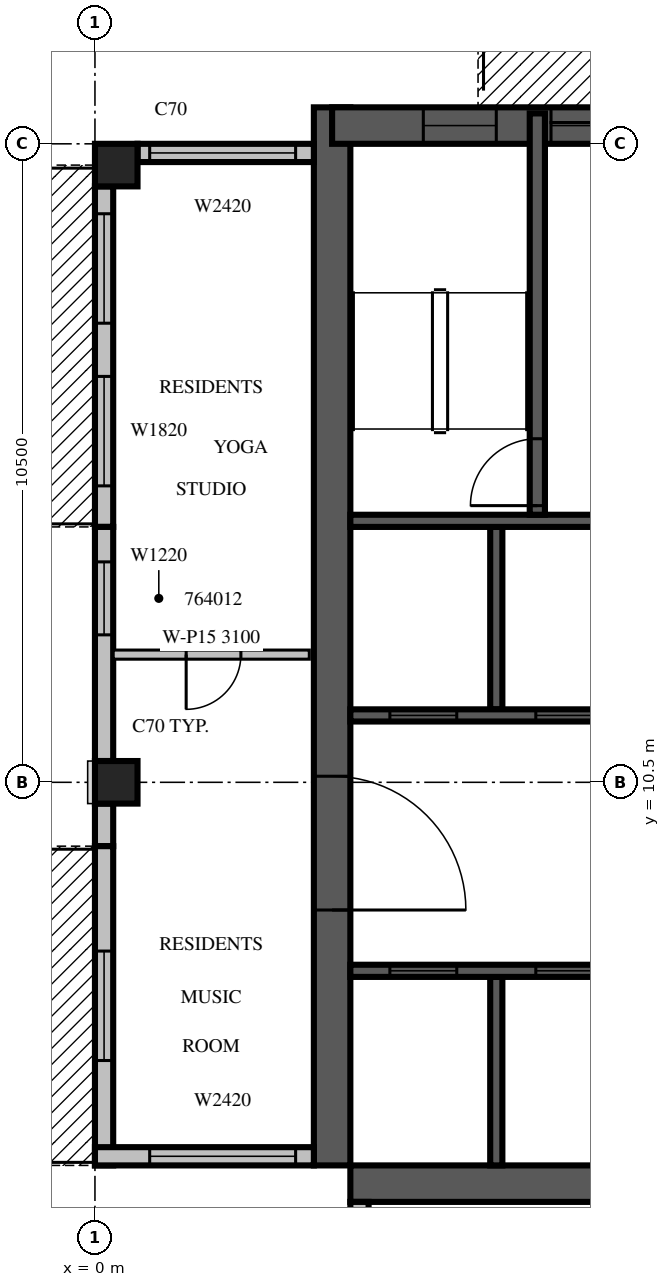
"""IFC4 building model, lengths in metres.
Left out: names, types, materials, properties, quantities, classifications, styles, units other than length and angle.
Written with IfcOpenShell. Run it as: python <this file> out.ifc"""

import sys

from ifc_helpers import new_model, si_unit, direction, frame, frame_2d, origin, origin_2d, place, context, subcontext, project, spatial, rectangle, extrude, source, transform, mapped, element, fill, save


model = new_model("IFC4")
c1 = context("Model", 3, precision=1e-05, world=origin(), true_north=direction((0.0, 1.0)))
c2 = subcontext(c1, "Body", "Model", "MODEL_VIEW")
j1 = project(units=[si_unit("LENGTHUNIT", "METRE"), si_unit("PLANEANGLEUNIT", "RADIAN")], contexts=[c1])
p1 = place(None, origin())
s1 = spatial("IfcSite", under=j1, at=p1, CompositionType="ELEMENT")
p2 = place(p1, origin())
s2 = spatial("IfcBuilding", under=s1, at=p2, CompositionType="ELEMENT")
p3 = place(p2, frame((0.0, 0.0, 284.5)))
s3 = spatial("IfcBuildingStorey", under=s2, at=p3, CompositionType="ELEMENT", Elevation=284.5)
m1 = source(origin(), c2, "Body", "SweptSolid", [
    extrude(rectangle(XDim=0.7, YDim=0.7, at=origin_2d()), origin(), (0.0, 0.0, 1.0), 3.5),
])
for number, where, z_axis, x_axis in (
    (1, (0.35, 10.5, 0.0), (0.0, 0.0, 1.0), (1.0, 0.0, 0.0)),
    (2, (0.35, 20.65, 0.0), (0.0, 0.0, 1.0), (1.0, 0.0, 0.0)),
):
    element("IfcColumn", number, at=place(p3, frame(where, z_axis=z_axis, x_axis=x_axis)), inside=s3, PredefinedType="COLUMN", context=c2, shape_type="MappedRepresentation", body=[
        mapped(m1, transform((0.0, 0.0, 0.0), scale=1.0)),
    ])
p4 = place(p3, frame((3.9, 4.2, 0.0), z_axis=(0.0, 0.0, 1.0), x_axis=(0.0, 1.0, 0.0)))
e3 = element("IfcWall", 3, at=p4, inside=s3, PredefinedType="SHEAR", context=c2, shape_type="SweptSolid", body=[
    extrude(rectangle(XDim=17.4, YDim=0.6, at=frame_2d((8.7, 0.0))), origin(), (0.0, 0.0, 1.0), 3.5),
])
m2 = source(origin(), c2, "Body", "SweptSolid", [
    extrude(rectangle(XDim=2.2, YDim=2.1, at=frame_2d((1.1, 1.05))), frame((0.0, 0.31, 0.0), z_axis=(0.0, -1.0, 0.0), x_axis=(1.0, 0.0, 0.0)), (0.0, 0.0, 1.0), 0.62),
])
p5 = place(p4, frame((4.2, 0.0, 0.0)))
e4 = element("IfcOpeningElement", 4, at=p5, cuts=e3, PredefinedType="OPENING", context=c2, shape_type="MappedRepresentation", body=[
    mapped(m2, transform((0.0, 0.0, 0.0), scale=1.0)),
])
m3 = source(origin(), c2, "Body", "SweptSolid", [
    extrude(rectangle(XDim=17.4, YDim=0.6, at=frame_2d((8.7, 0.0))), origin(), (0.0, 0.0, 1.0), 3.5),
])
p6 = place(p3, frame((4.2, 3.9, 0.0), z_axis=(0.0, 0.0, 1.0), x_axis=(1.0, 0.0, 0.0)))
e5 = element("IfcWall", 5, at=p6, inside=s3, PredefinedType="SHEAR", context=c2, shape_type="MappedRepresentation", body=[
    mapped(m3, transform((0.0, 0.0, 0.0), scale=1.0)),
])
p7 = place(p6, frame((11.55, 0.0, 0.0)))
e6 = element("IfcOpeningElement", 6, at=p7, cuts=e5, PredefinedType="OPENING", context=c2, shape_type="SweptSolid", body=[
    extrude(rectangle(XDim=0.9, YDim=2.1, at=frame_2d((0.45, 1.05))), frame((0.0, 0.31, 0.0), z_axis=(0.0, -1.0, 0.0), x_axis=(1.0, 0.0, 0.0)), (0.0, 0.0, 1.0), 0.62),
])
p8 = place(p3, frame((3.9, 21.3, 0.0), z_axis=(0.0, 0.0, 1.0), x_axis=(1.0, 0.0, 0.0)))
e7 = element("IfcWall", 7, at=p8, inside=s3, PredefinedType="SHEAR", context=c2, shape_type="SweptSolid", body=[
    extrude(rectangle(XDim=6.6, YDim=0.6, at=frame_2d((3.3, 0.0))), origin(), (0.0, 0.0, 1.0), 3.5),
])
m4 = source(origin(), c2, "Body", "SweptSolid", [
    extrude(rectangle(XDim=1.2, YDim=2.4, at=frame_2d((0.6, 1.2))), frame((0.0, 0.31, 0.0), z_axis=(0.0, -1.0, 0.0), x_axis=(1.0, 0.0, 0.0)), (0.0, 0.0, 1.0), 0.62),
])
p9 = place(p8, frame((1.5, 0.0, 0.6)))
e8 = element("IfcOpeningElement", 8, at=p9, cuts=e7, PredefinedType="OPENING", context=c2, shape_type="MappedRepresentation", body=[
    mapped(m4, transform((0.0, 0.0, 0.0), scale=1.0)),
])
p10 = place(p8, frame((3.6, 0.0, 0.6)))
e9 = element("IfcOpeningElement", 9, at=p10, cuts=e7, PredefinedType="OPENING", context=c2, shape_type="MappedRepresentation", body=[
    mapped(m4, transform((0.0, 0.0, 0.0), scale=1.0)),
])
p11 = place(p3, frame((3.6, 20.85, 0.0), z_axis=(0.0, 0.0, 1.0), x_axis=(-1.0, 0.0, 0.0)))
e10 = element("IfcWall", 10, at=p11, inside=s3, PredefinedType="STANDARD", context=c2, shape_type="SweptSolid", body=[
    extrude(rectangle(XDim=2.9, YDim=0.3, at=frame_2d((1.45, 0.0))), origin(), (0.0, 0.0, 1.0), 3.1),
])
m5 = source(origin(), c2, "Body", "SweptSolid", [
    extrude(rectangle(XDim=2.4, YDim=2.0, at=frame_2d((1.2, 1.0))), frame((0.0, 0.16, 0.0), z_axis=(0.0, -1.0, 0.0), x_axis=(1.0, 0.0, 0.0)), (0.0, 0.0, 1.0), 0.32),
])
p12 = place(p11, frame((0.3, 0.0, 0.6)))
e11 = element("IfcOpeningElement", 11, at=p12, cuts=e10, PredefinedType="OPENING", context=c2, shape_type="MappedRepresentation", body=[
    mapped(m5, transform((0.0, 0.0, 0.0), scale=1.0)),
])
p13 = place(p3, frame((0.15, 20.3, 0.0), z_axis=(0.0, 0.0, 1.0), x_axis=(0.0, -1.0, 0.0)))
e12 = element("IfcWall", 12, at=p13, inside=s3, PredefinedType="STANDARD", context=c2, shape_type="SweptSolid", body=[
    extrude(rectangle(XDim=5.6, YDim=0.3, at=frame_2d((2.8, 0.0))), origin(), (0.0, 0.0, 1.0), 3.1),
])
m6 = source(origin(), c2, "Body", "SweptSolid", [
    extrude(rectangle(XDim=1.8, YDim=2.4, at=frame_2d((0.9, 1.2))), frame((0.0, 0.16, 0.0), z_axis=(0.0, -1.0, 0.0), x_axis=(1.0, 0.0, 0.0)), (0.0, 0.0, 1.0), 0.32),
])
p14 = place(p13, frame((0.45, 0.0, 0.0)))
e13 = element("IfcOpeningElement", 13, at=p14, cuts=e12, PredefinedType="OPENING", context=c2, shape_type="MappedRepresentation", body=[
    mapped(m6, transform((0.0, 0.0, 0.0), scale=1.0)),
])
m7 = source(origin(), c2, "Body", "SweptSolid", [
    extrude(rectangle(XDim=1.8, YDim=2.0, at=frame_2d((0.9, 1.0))), frame((0.0, 0.16, 0.0), z_axis=(0.0, -1.0, 0.0), x_axis=(1.0, 0.0, 0.0)), (0.0, 0.0, 1.0), 0.32),
])
p15 = place(p13, frame((3.125, 0.0, 0.6)))
e14 = element("IfcOpeningElement", 14, at=p15, cuts=e12, PredefinedType="OPENING", context=c2, shape_type="MappedRepresentation", body=[
    mapped(m7, transform((0.0, 0.0, 0.0), scale=1.0)),
])
p16 = place(p3, frame((0.15, 14.7, 0.0), z_axis=(0.0, 0.0, 1.0), x_axis=(0.0, -1.0, 0.0)))
e15 = element("IfcWall", 15, at=p16, inside=s3, PredefinedType="STANDARD", context=c2, shape_type="SweptSolid", body=[
    extrude(rectangle(XDim=3.85, YDim=0.3, at=frame_2d((1.925, 0.0))), origin(), (0.0, 0.0, 1.0), 3.1),
])
m8 = source(origin(), c2, "Body", "SweptSolid", [
    extrude(rectangle(XDim=1.2, YDim=2.0, at=frame_2d((0.6, 1.0))), frame((0.0, 0.16, 0.0), z_axis=(0.0, -1.0, 0.0), x_axis=(1.0, 0.0, 0.0)), (0.0, 0.0, 1.0), 0.32),
])
p17 = place(p16, frame((0.575, 0.0, 0.6)))
e16 = element("IfcOpeningElement", 16, at=p17, cuts=e15, PredefinedType="OPENING", context=c2, shape_type="MappedRepresentation", body=[
    mapped(m8, transform((0.0, 0.0, 0.0), scale=1.0)),
])
p18 = place(p3, frame((0.15, 10.15, 0.0), z_axis=(0.0, 0.0, 1.0), x_axis=(0.0, -1.0, 0.0)))
e17 = element("IfcWall", 17, at=p18, inside=s3, PredefinedType="STANDARD", context=c2, shape_type="SweptSolid", body=[
    extrude(rectangle(XDim=0.7, YDim=0.3, at=frame_2d((0.35, 0.0))), origin(), (0.0, 0.0, 1.0), 3.1),
])
p19 = place(p3, frame((0.15, 9.45, 0.0), z_axis=(0.0, 0.0, 1.0), x_axis=(0.0, -1.0, 0.0)))
e18 = element("IfcWall", 18, at=p19, inside=s3, PredefinedType="STANDARD", context=c2, shape_type="SweptSolid", body=[
    extrude(rectangle(XDim=5.25, YDim=0.3, at=frame_2d((2.625, 0.0))), origin(), (0.0, 0.0, 1.0), 3.1),
])
p20 = place(p19, frame((1.725, 0.0, 0.0)))
e19 = element("IfcOpeningElement", 19, at=p20, cuts=e18, PredefinedType="OPENING", context=c2, shape_type="MappedRepresentation", body=[
    mapped(m6, transform((0.0, 0.0, 0.0), scale=1.0)),
])
p21 = place(p3, frame((0.0, 4.35, 0.0), z_axis=(0.0, 0.0, 1.0), x_axis=(1.0, 0.0, 0.0)))
e20 = element("IfcWall", 20, at=p21, inside=s3, PredefinedType="STANDARD", context=c2, shape_type="SweptSolid", body=[
    extrude(rectangle(XDim=3.6, YDim=0.3, at=frame_2d((1.8, 0.0))), origin(), (0.0, 0.0, 1.0), 3.1),
])
p22 = place(p21, frame((0.9, 0.0, 0.6)))
e21 = element("IfcOpeningElement", 21, at=p22, cuts=e20, PredefinedType="OPENING", context=c2, shape_type="MappedRepresentation", body=[
    mapped(m5, transform((0.0, 0.0, 0.0), scale=1.0)),
])
m9 = source(origin(), c2, "Body", "SweptSolid", [
    extrude(rectangle(XDim=3.6, YDim=0.3, at=frame_2d((1.8, 0.0))), origin(), (0.0, 0.0, 1.0), 3.1),
])
p23 = place(p3, frame((4.35, 3.6, 0.0), z_axis=(0.0, 0.0, 1.0), x_axis=(0.0, -1.0, 0.0)))
e22 = element("IfcWall", 22, at=p23, inside=s3, PredefinedType="STANDARD", context=c2, shape_type="MappedRepresentation", body=[
    mapped(m9, transform((0.0, 0.0, 0.0), scale=1.0)),
])
p24 = place(p23, frame((0.3, 0.0, 0.6)))
e23 = element("IfcOpeningElement", 23, at=p24, cuts=e22, PredefinedType="OPENING", context=c2, shape_type="MappedRepresentation", body=[
    mapped(m5, transform((0.0, 0.0, 0.0), scale=1.0)),
])
p25 = place(p3, frame((6.6, 4.2, 0.0), z_axis=(0.0, 0.0, 1.0), x_axis=(0.0, 1.0, 0.0)))
e24 = element("IfcWall", 24, at=p25, inside=s3, PredefinedType="SOLIDWALL", context=c2, shape_type="SweptSolid", body=[
    extrude(rectangle(XDim=3.1, YDim=0.2, at=frame_2d((1.55, 0.0))), origin(), (0.0, 0.0, 1.0), 3.5),
])
p26 = place(p3, frame((6.6, 11.7, 0.0), z_axis=(0.0, 0.0, 1.0), x_axis=(0.0, 1.0, 0.0)))
e25 = element("IfcWall", 25, at=p26, inside=s3, PredefinedType="SOLIDWALL", context=c2, shape_type="SweptSolid", body=[
    extrude(rectangle(XDim=3.0, YDim=0.2, at=frame_2d((1.5, 0.0))), origin(), (0.0, 0.0, 1.0), 3.5),
])
p27 = place(p3, frame((4.2, 7.4, 0.0), z_axis=(0.0, 0.0, 1.0), x_axis=(1.0, 0.0, 0.0)))
e26 = element("IfcWall", 26, at=p27, inside=s3, PredefinedType="SOLIDWALL", context=c2, shape_type="SweptSolid", body=[
    extrude(rectangle(XDim=9.6, YDim=0.2, at=frame_2d((4.8, 0.0))), origin(), (0.0, 0.0, 1.0), 3.5),
])
m10 = source(origin(), c2, "Body", "SweptSolid", [
    extrude(rectangle(XDim=1.1, YDim=2.1, at=frame_2d((0.55, 1.05))), frame((0.0, 0.11, 0.0), z_axis=(0.0, -1.0, 0.0), x_axis=(1.0, 0.0, 0.0)), (0.0, 0.0, 1.0), 0.22),
])
p28 = place(p27, frame((0.65, 0.0, 0.0)))
e27 = element("IfcOpeningElement", 27, at=p28, cuts=e26, PredefinedType="OPENING", context=c2, shape_type="MappedRepresentation", body=[
    mapped(m10, transform((0.0, 0.0, 0.0), scale=1.0)),
])
p29 = place(p27, frame((3.05, 0.0, 0.0)))
e28 = element("IfcOpeningElement", 28, at=p29, cuts=e26, PredefinedType="OPENING", context=c2, shape_type="MappedRepresentation", body=[
    mapped(m10, transform((0.0, 0.0, 0.0), scale=1.0)),
])
p30 = place(p27, frame((5.45, 0.0, 0.0)))
e29 = element("IfcOpeningElement", 29, at=p30, cuts=e26, PredefinedType="OPENING", context=c2, shape_type="MappedRepresentation", body=[
    mapped(m10, transform((0.0, 0.0, 0.0), scale=1.0)),
])
p31 = place(p27, frame((7.85, 0.0, 0.0)))
e30 = element("IfcOpeningElement", 30, at=p31, cuts=e26, PredefinedType="OPENING", context=c2, shape_type="MappedRepresentation", body=[
    mapped(m10, transform((0.0, 0.0, 0.0), scale=1.0)),
])
p32 = place(p3, frame((4.2, 11.6, 0.0), z_axis=(0.0, 0.0, 1.0), x_axis=(1.0, 0.0, 0.0)))
e31 = element("IfcWall", 31, at=p32, inside=s3, PredefinedType="SOLIDWALL", context=c2, shape_type="SweptSolid", body=[
    extrude(rectangle(XDim=4.8, YDim=0.2, at=frame_2d((2.4, 0.0))), origin(), (0.0, 0.0, 1.0), 3.5),
])
p33 = place(p32, frame((0.65, 0.0, 0.0)))
e32 = element("IfcOpeningElement", 32, at=p33, cuts=e31, PredefinedType="OPENING", context=c2, shape_type="MappedRepresentation", body=[
    mapped(m10, transform((0.0, 0.0, 0.0), scale=1.0)),
])
p34 = place(p32, frame((3.05, 0.0, 0.0)))
e33 = element("IfcOpeningElement", 33, at=p34, cuts=e31, PredefinedType="OPENING", context=c2, shape_type="MappedRepresentation", body=[
    mapped(m10, transform((0.0, 0.0, 0.0), scale=1.0)),
])
m11 = source(origin(), c2, "Body", "SweptSolid", [
    extrude(rectangle(XDim=4.8, YDim=0.2, at=frame_2d((2.4, 0.0))), origin(), (0.0, 0.0, 1.0), 3.5),
])
p35 = place(p3, frame((4.2, 14.8, 0.0), z_axis=(0.0, 0.0, 1.0), x_axis=(1.0, 0.0, 0.0)))
e34 = element("IfcWall", 34, at=p35, inside=s3, PredefinedType="SOLIDWALL", context=c2, shape_type="MappedRepresentation", body=[
    mapped(m11, transform((0.0, 0.0, 0.0), scale=1.0)),
])
p36 = place(p3, frame((7.275, 14.9, 0.0), z_axis=(0.0, 0.0, 1.0), x_axis=(0.0, 1.0, 0.0)))
e35 = element("IfcWall", 35, at=p36, inside=s3, PredefinedType="SOLIDWALL", context=c2, shape_type="SweptSolid", body=[
    extrude(rectangle(XDim=6.6, YDim=0.25, at=frame_2d((3.3, 0.0))), origin(), (0.0, 0.0, 1.0), 3.1),
])
m12 = source(origin(), c2, "Body", "SweptSolid", [
    extrude(rectangle(XDim=1.1, YDim=2.1, at=frame_2d((0.55, 1.05))), frame((0.0, 0.135, 0.0), z_axis=(0.0, -1.0, 0.0), x_axis=(1.0, 0.0, 0.0)), (0.0, 0.0, 1.0), 0.27),
])
p37 = place(p36, frame((0.15, 0.0, 0.0)))
e36 = element("IfcOpeningElement", 36, at=p37, cuts=e35, PredefinedType="OPENING", context=c2, shape_type="MappedRepresentation", body=[
    mapped(m12, transform((0.0, 0.0, 0.0), scale=1.0)),
])
p38 = place(p3, frame((0.3, 12.6, 0.0), z_axis=(0.0, 0.0, 1.0), x_axis=(1.0, 0.0, 0.0)))
e37 = element("IfcWall", 37, at=p38, inside=s3, PredefinedType="PARTITIONING", context=c2, shape_type="SweptSolid", body=[
    extrude(rectangle(XDim=3.225, YDim=0.15, at=frame_2d((1.613, 0.0))), origin(), (0.0, 0.0, 1.0), 3.1),
])
m13 = source(origin(), c2, "Body", "SweptSolid", [
    extrude(rectangle(XDim=0.9, YDim=2.1, at=frame_2d((0.45, 1.05))), frame((0.0, 0.085, 0.0), z_axis=(0.0, -1.0, 0.0), x_axis=(1.0, 0.0, 0.0)), (0.0, 0.0, 1.0), 0.17),
])
p39 = place(p38, frame((1.2, 0.0, 0.0)))
e38 = element("IfcOpeningElement", 38, at=p39, cuts=e37, PredefinedType="OPENING", context=c2, shape_type="MappedRepresentation", body=[
    mapped(m13, transform((0.0, 0.0, 0.0), scale=1.0)),
])
m14 = source(origin(), c2, "Body", "SweptSolid", [
    extrude(rectangle(XDim=2.4, YDim=2.0, at=frame_2d((1.2, 1.0))), frame((0.0, 0.03, 0.0), z_axis=(0.0, -1.0, 0.0), x_axis=(1.0, 0.0, 0.0)), (0.0, 0.0, 1.0), 0.06),
])
p40 = place(p12, origin())
e39 = element("IfcWindow", 39, at=p40, inside=s3, PartitioningType="SINGLE_PANEL", PredefinedType="WINDOW", context=c2, shape_type="MappedRepresentation", body=[
    mapped(m14, transform((0.0, 0.0, 0.0), scale=1.0)),
])
fill(e11, e39)
m15 = source(origin(), c2, "Body", "SweptSolid", [
    extrude(rectangle(XDim=1.8, YDim=2.4, at=frame_2d((0.9, 1.2))), frame((0.0, 0.025, 0.0), z_axis=(0.0, -1.0, 0.0), x_axis=(1.0, 0.0, 0.0)), (0.0, 0.0, 1.0), 0.05),
])
p41 = place(p14, origin())
e40 = element("IfcDoor", 40, at=p41, inside=s3, OperationType="SLIDING_TO_LEFT", PredefinedType="DOOR", context=c2, shape_type="MappedRepresentation", body=[
    mapped(m15, transform((0.0, 0.0, 0.0), scale=1.0)),
])
fill(e13, e40)
m16 = source(origin(), c2, "Body", "SweptSolid", [
    extrude(rectangle(XDim=1.8, YDim=2.0, at=frame_2d((0.9, 1.0))), frame((0.0, 0.03, 0.0), z_axis=(0.0, -1.0, 0.0), x_axis=(1.0, 0.0, 0.0)), (0.0, 0.0, 1.0), 0.06),
])
p42 = place(p15, origin())
e41 = element("IfcWindow", 41, at=p42, inside=s3, PartitioningType="SINGLE_PANEL", PredefinedType="WINDOW", context=c2, shape_type="MappedRepresentation", body=[
    mapped(m16, transform((0.0, 0.0, 0.0), scale=1.0)),
])
fill(e14, e41)
m17 = source(origin(), c2, "Body", "SweptSolid", [
    extrude(rectangle(XDim=1.2, YDim=2.0, at=frame_2d((0.6, 1.0))), frame((0.0, 0.03, 0.0), z_axis=(0.0, -1.0, 0.0), x_axis=(1.0, 0.0, 0.0)), (0.0, 0.0, 1.0), 0.06),
])
p43 = place(p17, origin())
e42 = element("IfcWindow", 42, at=p43, inside=s3, PartitioningType="SINGLE_PANEL", PredefinedType="WINDOW", context=c2, shape_type="MappedRepresentation", body=[
    mapped(m17, transform((0.0, 0.0, 0.0), scale=1.0)),
])
fill(e16, e42)
p44 = place(p20, origin())
e43 = element("IfcDoor", 43, at=p44, inside=s3, OperationType="SLIDING_TO_LEFT", PredefinedType="DOOR", context=c2, shape_type="MappedRepresentation", body=[
    mapped(m15, transform((0.0, 0.0, 0.0), scale=1.0)),
])
fill(e19, e43)
p45 = place(p22, origin())
e44 = element("IfcWindow", 44, at=p45, inside=s3, PartitioningType="SINGLE_PANEL", PredefinedType="WINDOW", context=c2, shape_type="MappedRepresentation", body=[
    mapped(m14, transform((0.0, 0.0, 0.0), scale=1.0)),
])
fill(e21, e44)
m18 = source(origin(), c2, "Body", "SweptSolid", [
    extrude(rectangle(XDim=1.1, YDim=2.1, at=frame_2d((0.55, 1.05))), frame((0.0, 0.025, 0.0), z_axis=(0.0, -1.0, 0.0), x_axis=(1.0, 0.0, 0.0)), (0.0, 0.0, 1.0), 0.05),
])
p46 = place(p28, origin())
e45 = element("IfcDoor", 45, at=p46, inside=s3, OperationType="SLIDING_TO_LEFT", PredefinedType="DOOR", context=c2, shape_type="MappedRepresentation", body=[
    mapped(m18, transform((0.0, 0.0, 0.0), scale=1.0)),
])
fill(e27, e45)
p47 = place(p29, origin())
e46 = element("IfcDoor", 46, at=p47, inside=s3, OperationType="SLIDING_TO_LEFT", PredefinedType="DOOR", context=c2, shape_type="MappedRepresentation", body=[
    mapped(m18, transform((0.0, 0.0, 0.0), scale=1.0)),
])
fill(e28, e46)
p48 = place(p33, origin())
e47 = element("IfcDoor", 47, at=p48, inside=s3, OperationType="SLIDING_TO_LEFT", PredefinedType="DOOR", context=c2, shape_type="MappedRepresentation", body=[
    mapped(m18, transform((0.0, 0.0, 0.0), scale=1.0)),
])
fill(e32, e47)
p49 = place(p34, origin())
e48 = element("IfcDoor", 48, at=p49, inside=s3, OperationType="SLIDING_TO_LEFT", PredefinedType="DOOR", context=c2, shape_type="MappedRepresentation", body=[
    mapped(m18, transform((0.0, 0.0, 0.0), scale=1.0)),
])
fill(e33, e48)
p50 = place(p37, origin())
e49 = element("IfcDoor", 49, at=p50, inside=s3, OperationType="SINGLE_SWING_LEFT", PredefinedType="DOOR", context=c2, shape_type="MappedRepresentation", body=[
    mapped(m18, transform((0.0, 0.0, 0.0), scale=1.0)),
])
fill(e36, e49)
m19 = source(origin(), c2, "Body", "SweptSolid", [
    extrude(rectangle(XDim=2.2, YDim=2.1, at=frame_2d((1.1, 1.05))), frame((0.0, 0.025, 0.0), z_axis=(0.0, -1.0, 0.0), x_axis=(1.0, 0.0, 0.0)), (0.0, 0.0, 1.0), 0.05),
])
p51 = place(p5, origin())
e50 = element("IfcDoor", 50, at=p51, inside=s3, OperationType="DOUBLE_DOOR_SINGLE_SWING", PredefinedType="DOOR", context=c2, shape_type="MappedRepresentation", body=[
    mapped(m19, transform((0.0, 0.0, 0.0), scale=1.0)),
])
fill(e4, e50)
m20 = source(origin(), c2, "Body", "SweptSolid", [
    extrude(rectangle(XDim=1.2, YDim=2.4, at=frame_2d((0.6, 1.2))), frame((0.0, 0.03, 0.0), z_axis=(0.0, -1.0, 0.0), x_axis=(1.0, 0.0, 0.0)), (0.0, 0.0, 1.0), 0.06),
])
p52 = place(p9, origin())
e51 = element("IfcWindow", 51, at=p52, inside=s3, PartitioningType="SINGLE_PANEL", PredefinedType="WINDOW", context=c2, shape_type="MappedRepresentation", body=[
    mapped(m20, transform((0.0, 0.0, 0.0), scale=1.0)),
])
fill(e8, e51)
p53 = place(p10, origin())
e52 = element("IfcWindow", 52, at=p53, inside=s3, PartitioningType="SINGLE_PANEL", PredefinedType="WINDOW", context=c2, shape_type="MappedRepresentation", body=[
    mapped(m20, transform((0.0, 0.0, 0.0), scale=1.0)),
])
fill(e9, e52)
m21 = source(origin(), c2, "Body", "SweptSolid", [
    extrude(rectangle(XDim=0.9, YDim=2.1, at=frame_2d((0.45, 1.05))), frame((0.0, 0.025, 0.0), z_axis=(0.0, -1.0, 0.0), x_axis=(1.0, 0.0, 0.0)), (0.0, 0.0, 1.0), 0.05),
])
p54 = place(p39, origin())
e53 = element("IfcDoor", 53, at=p54, inside=s3, OperationType="SINGLE_SWING_RIGHT", PredefinedType="DOOR", context=c2, shape_type="MappedRepresentation", body=[
    mapped(m21, transform((0.0, 0.0, 0.0), scale=1.0)),
])
fill(e38, e53)
save(model, sys.argv[1])
